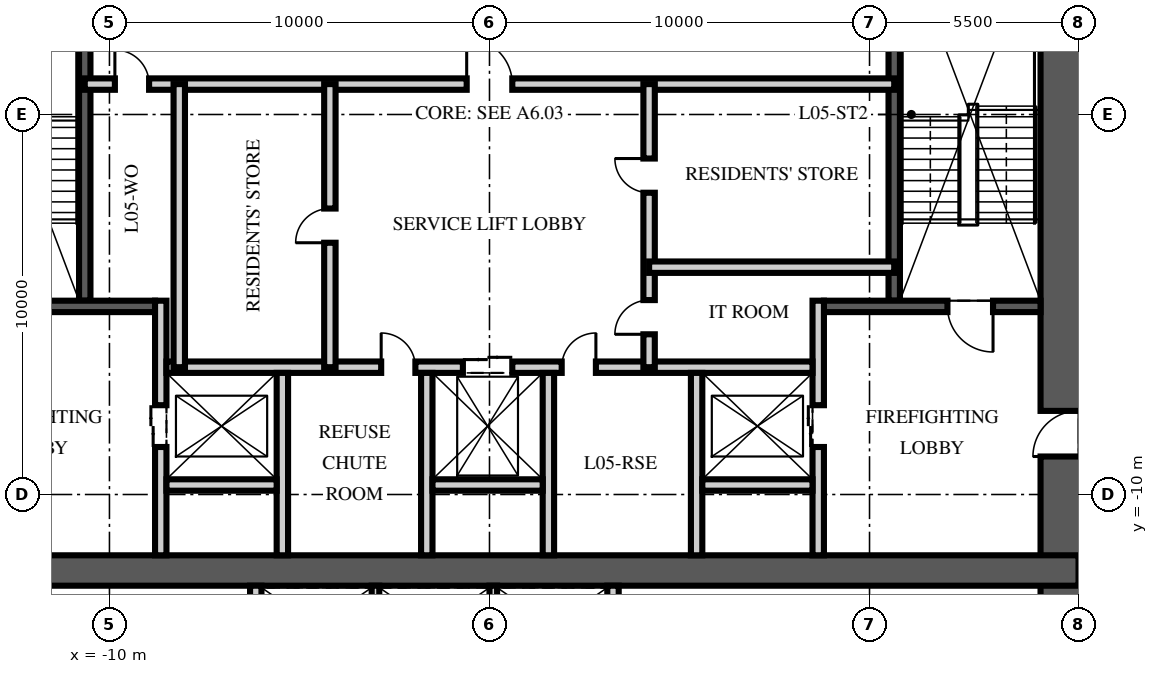
"""IFC4 building model, lengths in metres.
Left out: names, types, materials, properties, quantities, classifications, styles, units other than length and angle.
Written with IfcOpenShell. Run it as: python <this file> out.ifc"""

import sys

from ifc_helpers import new_model, si_unit, direction, frame, frame_2d, origin, place, context, subcontext, project, spatial, rectangle, extrude, element, fill, save


model = new_model("IFC4")
c1 = context("Model", 3, precision=1e-05, world=origin(), true_north=direction((0.0, 1.0)))
c2 = subcontext(c1, "Body", "Model", "MODEL_VIEW")
j1 = project(units=[si_unit("LENGTHUNIT", "METRE"), si_unit("PLANEANGLEUNIT", "RADIAN")], contexts=[c1])
p1 = place(None, origin())
s1 = spatial("IfcSite", under=j1, at=p1, CompositionType="ELEMENT")
p2 = place(p1, origin())
s2 = spatial("IfcBuilding", under=s1, at=p2, CompositionType="ELEMENT")
p3 = place(p2, frame((0.0, 0.0, 24.75)))
s3 = spatial("IfcBuildingStorey", under=s2, at=p3, CompositionType="ELEMENT", Elevation=24.75)
p4 = place(p3, frame((15.5, -15.5, -0.25), z_axis=(0.0, 0.0, 1.0), x_axis=(0.0, 1.0, 0.0)))
e1 = element("IfcWall", 1, at=p4, inside=s3, PredefinedType="SHEAR", context=c2, shape_type="SweptSolid", body=[
    extrude(rectangle(XDim=31.0, YDim=2.0, at=frame_2d((15.5, 0.0))), origin(), (0.0, 0.0, 1.0), 3.75),
])
p5 = place(p4, frame((6.5, 0.0, 0.25)))
e2 = element("IfcOpeningElement", 2, at=p5, cuts=e1, PredefinedType="OPENING", context=c2, shape_type="SweptSolid", body=[
    extrude(rectangle(XDim=1.2, YDim=2.1, at=frame_2d((0.6, 1.05))), frame((0.0, 1.01, 0.0), z_axis=(0.0, -1.0, 0.0), x_axis=(1.0, 0.0, 0.0)), (0.0, 0.0, 1.0), 2.02),
])
p6 = place(p4, frame((23.0, 0.0, 0.25)))
e3 = element("IfcOpeningElement", 3, at=p6, cuts=e1, PredefinedType="OPENING", context=c2, shape_type="SweptSolid", body=[
    extrude(rectangle(XDim=1.8, YDim=2.1, at=frame_2d((0.9, 1.05))), frame((0.0, 1.01, 0.0), z_axis=(0.0, -1.0, 0.0), x_axis=(1.0, 0.0, 0.0)), (0.0, 0.0, 1.0), 2.02),
])
p7 = place(p3, frame((-15.5, -12.0, -0.25), z_axis=(0.0, 0.0, 1.0), x_axis=(1.0, 0.0, 0.0)))
e4 = element("IfcWall", 4, at=p7, inside=s3, PredefinedType="SHEAR", context=c2, shape_type="SweptSolid", body=[
    extrude(rectangle(XDim=31.0, YDim=0.8, at=frame_2d((15.5, 0.0))), origin(), (0.0, 0.0, 1.0), 3.75),
])
p8 = place(p3, frame((-10.65, -4.9, 0.0), z_axis=(0.0, 0.0, 1.0), x_axis=(0.0, 1.0, 0.0)))
e5 = element("IfcWall", 5, at=p8, inside=s3, PredefinedType="SOLIDWALL", context=c2, shape_type="SweptSolid", body=[
    extrude(rectangle(XDim=10.1, YDim=0.3, at=frame_2d((5.05, 0.0))), origin(), (0.0, 0.0, 1.0), 3.5),
])
p9 = place(p3, frame((-14.5, -5.05, 0.0), z_axis=(0.0, 0.0, 1.0), x_axis=(1.0, 0.0, 0.0)))
e6 = element("IfcWall", 6, at=p9, inside=s3, PredefinedType="SOLIDWALL", context=c2, shape_type="SweptSolid", body=[
    extrude(rectangle(XDim=5.7, YDim=0.3, at=frame_2d((2.85, 0.0))), origin(), (0.0, 0.0, 1.0), 3.5),
])
p10 = place(p9, frame((1.25, 0.0, 0.0)))
e7 = element("IfcOpeningElement", 7, at=p10, cuts=e6, PredefinedType="OPENING", context=c2, shape_type="SweptSolid", body=[
    extrude(rectangle(XDim=1.2, YDim=2.1, at=frame_2d((0.6, 1.05))), frame((0.0, 0.16, 0.0), z_axis=(0.0, -1.0, 0.0), x_axis=(1.0, 0.0, 0.0)), (0.0, 0.0, 1.0), 0.32),
])
p11 = place(p3, frame((-8.65, -11.6, 0.0), z_axis=(0.0, 0.0, 1.0), x_axis=(0.0, 1.0, 0.0)))
e8 = element("IfcWall", 8, at=p11, inside=s3, PredefinedType="PARTITIONING", context=c2, shape_type="SweptSolid", body=[
    extrude(rectangle(XDim=6.7, YDim=0.3, at=frame_2d((3.35, 0.0))), origin(), (0.0, 0.0, 1.0), 3.5),
])
p12 = place(p11, frame((2.85, 0.0, 0.0)))
e9 = element("IfcOpeningElement", 9, at=p12, cuts=e8, PredefinedType="OPENING", context=c2, shape_type="SweptSolid", body=[
    extrude(rectangle(XDim=1.1, YDim=2.1, at=frame_2d((0.55, 1.05))), frame((0.0, 0.16, 0.0), z_axis=(0.0, -1.0, 0.0), x_axis=(1.0, 0.0, 0.0)), (0.0, 0.0, 1.0), 0.32),
])
p13 = place(p3, frame((10.65, -4.9, 0.0), z_axis=(0.0, 0.0, 1.0), x_axis=(0.0, 1.0, 0.0)))
e10 = element("IfcWall", 10, at=p13, inside=s3, PredefinedType="SOLIDWALL", context=c2, shape_type="SweptSolid", body=[
    extrude(rectangle(XDim=10.1, YDim=0.3, at=frame_2d((5.05, 0.0))), origin(), (0.0, 0.0, 1.0), 3.5),
])
p14 = place(p3, frame((14.5, -5.05, 0.0), z_axis=(0.0, 0.0, 1.0), x_axis=(-1.0, 0.0, 0.0)))
e11 = element("IfcWall", 11, at=p14, inside=s3, PredefinedType="SOLIDWALL", context=c2, shape_type="SweptSolid", body=[
    extrude(rectangle(XDim=5.7, YDim=0.3, at=frame_2d((2.85, 0.0))), origin(), (0.0, 0.0, 1.0), 3.5),
])
p15 = place(p14, frame((1.25, 0.0, 0.0)))
e12 = element("IfcOpeningElement", 12, at=p15, cuts=e11, PredefinedType="OPENING", context=c2, shape_type="SweptSolid", body=[
    extrude(rectangle(XDim=1.2, YDim=2.1, at=frame_2d((0.6, 1.05))), frame((0.0, 0.16, 0.0), z_axis=(0.0, -1.0, 0.0), x_axis=(1.0, 0.0, 0.0)), (0.0, 0.0, 1.0), 0.32),
])
p16 = place(p3, frame((8.65, -11.6, 0.0), z_axis=(0.0, 0.0, 1.0), x_axis=(0.0, 1.0, 0.0)))
e13 = element("IfcWall", 13, at=p16, inside=s3, PredefinedType="PARTITIONING", context=c2, shape_type="SweptSolid", body=[
    extrude(rectangle(XDim=6.7, YDim=0.3, at=frame_2d((3.35, 0.0))), origin(), (0.0, 0.0, 1.0), 3.5),
])
p17 = place(p16, frame((2.85, 0.0, 0.0)))
e14 = element("IfcOpeningElement", 14, at=p17, cuts=e13, PredefinedType="OPENING", context=c2, shape_type="SweptSolid", body=[
    extrude(rectangle(XDim=1.1, YDim=2.1, at=frame_2d((0.55, 1.05))), frame((0.0, 0.16, 0.0), z_axis=(0.0, -1.0, 0.0), x_axis=(1.0, 0.0, 0.0)), (0.0, 0.0, 1.0), 0.32),
])
p18 = place(p3, frame((-8.5, -6.65, 0.0), z_axis=(0.0, 0.0, 1.0), x_axis=(1.0, 0.0, 0.0)))
e15 = element("IfcWall", 15, at=p18, inside=s3, PredefinedType="PARTITIONING", context=c2, shape_type="SweptSolid", body=[
    extrude(rectangle(XDim=17.0, YDim=0.3, at=frame_2d((8.5, 0.0))), origin(), (0.0, 0.0, 1.0), 3.5),
])
p19 = place(p18, frame((7.8, 0.0, 0.0)))
e16 = element("IfcOpeningElement", 16, at=p19, cuts=e15, PredefinedType="OPENING", context=c2, shape_type="SweptSolid", body=[
    extrude(rectangle(XDim=1.3, YDim=2.4, at=frame_2d((0.65, 1.2))), frame((0.0, 0.16, 0.0), z_axis=(0.0, -1.0, 0.0), x_axis=(1.0, 0.0, 0.0)), (0.0, 0.0, 1.0), 0.32),
])
p20 = place(p18, frame((5.65, 0.0, 0.0)))
e17 = element("IfcOpeningElement", 17, at=p20, cuts=e15, PredefinedType="OPENING", context=c2, shape_type="SweptSolid", body=[
    extrude(rectangle(XDim=0.9, YDim=2.1, at=frame_2d((0.45, 1.05))), frame((0.0, 0.16, 0.0), z_axis=(0.0, -1.0, 0.0), x_axis=(1.0, 0.0, 0.0)), (0.0, 0.0, 1.0), 0.32),
])
p21 = place(p18, frame((10.4, 0.0, 0.0)))
e18 = element("IfcOpeningElement", 18, at=p21, cuts=e15, PredefinedType="OPENING", context=c2, shape_type="SweptSolid", body=[
    extrude(rectangle(XDim=0.9, YDim=2.1, at=frame_2d((0.45, 1.05))), frame((0.0, 0.16, 0.0), z_axis=(0.0, -1.0, 0.0), x_axis=(1.0, 0.0, 0.0)), (0.0, 0.0, 1.0), 0.32),
])
for number, where, z_axis, x_axis in (
    (19, (-5.45, -11.6, 0.0), (0.0, 0.0, 1.0), (0.0, 1.0, 0.0)),
    (20, (-1.65, -11.6, 0.0), (0.0, 0.0, 1.0), (0.0, 1.0, 0.0)),
    (21, (1.55, -11.6, 0.0), (0.0, 0.0, 1.0), (0.0, 1.0, 0.0)),
    (22, (5.45, -11.6, 0.0), (0.0, 0.0, 1.0), (0.0, 1.0, 0.0)),
):
    element("IfcWall", number, at=place(p3, frame(where, z_axis=z_axis, x_axis=x_axis)), inside=s3, PredefinedType="PARTITIONING", context=c2, shape_type="SweptSolid", body=[
        extrude(rectangle(XDim=4.8, YDim=0.3, at=frame_2d((2.4, 0.0))), origin(), (0.0, 0.0, 1.0), 3.5),
    ])
for number, where, z_axis, x_axis in (
    (23, (-8.5, -9.75, 0.0), (0.0, 0.0, 1.0), (1.0, 0.0, 0.0)),
    (24, (-1.5, -9.75, 0.0), (0.0, 0.0, 1.0), (1.0, 0.0, 0.0)),
    (25, (5.6, -9.75, 0.0), (0.0, 0.0, 1.0), (1.0, 0.0, 0.0)),
):
    element("IfcWall", number, at=place(p3, frame(where, z_axis=z_axis, x_axis=x_axis)), inside=s3, PredefinedType="PARTITIONING", context=c2, shape_type="SweptSolid", body=[
        extrude(rectangle(XDim=2.9, YDim=0.3, at=frame_2d((1.45, 0.0))), origin(), (0.0, 0.0, 1.0), 3.5),
    ])
for number, where, z_axis, x_axis in (
    (26, (-6.15, -14.5, 0.0), (0.0, 0.0, 1.0), (0.0, 1.0, 0.0)),
    (27, (3.25, -14.5, 0.0), (0.0, 0.0, 1.0), (0.0, 1.0, 0.0)),
):
    element("IfcWall", number, at=place(p3, frame(where, z_axis=z_axis, x_axis=x_axis)), inside=s3, PredefinedType="PARTITIONING", context=c2, shape_type="SweptSolid", body=[
        extrude(rectangle(XDim=2.1, YDim=0.3, at=frame_2d((1.05, 0.0))), origin(), (0.0, 0.0, 1.0), 3.5),
    ])
for number, where, z_axis, x_axis in (
    (28, (-3.0, -14.5, 0.0), (0.0, 0.0, 1.0), (0.0, 1.0, 0.0)),
    (29, (0.1, -14.5, 0.0), (0.0, 0.0, 1.0), (0.0, 1.0, 0.0)),
):
    element("IfcWall", number, at=place(p3, frame(where, z_axis=z_axis, x_axis=x_axis)), inside=s3, PredefinedType="PARTITIONING", context=c2, shape_type="SweptSolid", body=[
        extrude(rectangle(XDim=2.1, YDim=0.2, at=frame_2d((1.05, 0.0))), origin(), (0.0, 0.0, 1.0), 3.5),
    ])
p22 = place(p3, frame((-10.65, 0.8, 0.0), z_axis=(0.0, 0.0, 1.0), x_axis=(1.0, 0.0, 0.0)))
e30 = element("IfcWall", 30, at=p22, inside=s3, PredefinedType="PARTITIONING", context=c2, shape_type="SweptSolid", body=[
    extrude(rectangle(XDim=21.3, YDim=0.3, at=frame_2d((10.65, 0.0))), origin(), (0.0, 0.0, 1.0), 3.5),
])
p23 = place(p22, frame((10.05, 0.0, 0.0)))
e31 = element("IfcOpeningElement", 31, at=p23, cuts=e30, PredefinedType="OPENING", context=c2, shape_type="SweptSolid", body=[
    extrude(rectangle(XDim=1.2, YDim=2.1, at=frame_2d((0.6, 1.05))), frame((0.0, 0.16, 0.0), z_axis=(0.0, -1.0, 0.0), x_axis=(1.0, 0.0, 0.0)), (0.0, 0.0, 1.0), 0.32),
])
p24 = place(p22, frame((0.793, 0.0, 0.0)))
e32 = element("IfcOpeningElement", 32, at=p24, cuts=e30, PredefinedType="OPENING", context=c2, shape_type="SweptSolid", body=[
    extrude(rectangle(XDim=0.9, YDim=2.1, at=frame_2d((0.45, 1.05))), frame((0.0, 0.16, 0.0), z_axis=(0.0, -1.0, 0.0), x_axis=(1.0, 0.0, 0.0)), (0.0, 0.0, 1.0), 0.32),
])
p25 = place(p3, frame((-4.2, -6.65, 0.0), z_axis=(0.0, 0.0, 1.0), x_axis=(0.0, 1.0, 0.0)))
e33 = element("IfcWall", 33, at=p25, inside=s3, PredefinedType="PARTITIONING", context=c2, shape_type="SweptSolid", body=[
    extrude(rectangle(XDim=7.45, YDim=0.3, at=frame_2d((3.725, 0.0))), origin(), (0.0, 0.0, 1.0), 3.5),
])
p26 = place(p25, frame((3.275, 0.0, 0.0)))
e34 = element("IfcOpeningElement", 34, at=p26, cuts=e33, PredefinedType="OPENING", context=c2, shape_type="SweptSolid", body=[
    extrude(rectangle(XDim=0.9, YDim=2.1, at=frame_2d((0.45, 1.05))), frame((0.0, 0.16, 0.0), z_axis=(0.0, -1.0, 0.0), x_axis=(1.0, 0.0, 0.0)), (0.0, 0.0, 1.0), 0.32),
])
p27 = place(p3, frame((4.2, -6.65, 0.0), z_axis=(0.0, 0.0, 1.0), x_axis=(0.0, 1.0, 0.0)))
e35 = element("IfcWall", 35, at=p27, inside=s3, PredefinedType="PARTITIONING", context=c2, shape_type="SweptSolid", body=[
    extrude(rectangle(XDim=7.45, YDim=0.3, at=frame_2d((3.725, 0.0))), origin(), (0.0, 0.0, 1.0), 3.5),
])
p28 = place(p27, frame((0.866, 0.0, 0.0)))
e36 = element("IfcOpeningElement", 36, at=p28, cuts=e35, PredefinedType="OPENING", context=c2, shape_type="SweptSolid", body=[
    extrude(rectangle(XDim=0.9, YDim=2.1, at=frame_2d((0.45, 1.05))), frame((0.0, 0.16, 0.0), z_axis=(0.0, -1.0, 0.0), x_axis=(1.0, 0.0, 0.0)), (0.0, 0.0, 1.0), 0.32),
])
p29 = place(p27, frame((4.591, 0.0, 0.0)))
e37 = element("IfcOpeningElement", 37, at=p29, cuts=e35, PredefinedType="OPENING", context=c2, shape_type="SweptSolid", body=[
    extrude(rectangle(XDim=0.9, YDim=2.1, at=frame_2d((0.45, 1.05))), frame((0.0, 0.16, 0.0), z_axis=(0.0, -1.0, 0.0), x_axis=(1.0, 0.0, 0.0)), (0.0, 0.0, 1.0), 0.32),
])
p30 = place(p3, frame((-8.163, -6.65, 0.0), z_axis=(0.0, 0.0, 1.0), x_axis=(0.0, 1.0, 0.0)))
e38 = element("IfcWall", 38, at=p30, inside=s3, PredefinedType="PARTITIONING", context=c2, shape_type="SweptSolid", body=[
    extrude(rectangle(XDim=7.45, YDim=0.3, at=frame_2d((3.725, 0.0))), origin(), (0.0, 0.0, 1.0), 3.5),
])
p31 = place(p3, frame((10.65, -4.018, 0.0), z_axis=(0.0, 0.0, 1.0), x_axis=(-1.0, 0.0, 0.0)))
e39 = element("IfcWall", 39, at=p31, inside=s3, PredefinedType="PARTITIONING", context=c2, shape_type="SweptSolid", body=[
    extrude(rectangle(XDim=6.45, YDim=0.3, at=frame_2d((3.225, 0.0))), origin(), (0.0, 0.0, 1.0), 3.5),
])
p32 = place(p15, origin())
e40 = element("IfcDoor", 40, at=p32, inside=s3, OperationType="SINGLE_SWING_LEFT", PredefinedType="DOOR", context=c2, shape_type="SweptSolid", body=[
    extrude(rectangle(XDim=1.2, YDim=2.1, at=frame_2d((0.6, 1.05))), frame((0.0, 0.025, 0.0), z_axis=(0.0, -1.0, 0.0), x_axis=(1.0, 0.0, 0.0)), (0.0, 0.0, 1.0), 0.05),
])
fill(e12, e40)
p33 = place(p5, origin())
e41 = element("IfcDoor", 41, at=p33, inside=s3, OperationType="SINGLE_SWING_LEFT", PredefinedType="DOOR", context=c2, shape_type="SweptSolid", body=[
    extrude(rectangle(XDim=1.2, YDim=2.1, at=frame_2d((0.6, 1.05))), frame((0.0, 0.025, 0.0), z_axis=(0.0, -1.0, 0.0), x_axis=(1.0, 0.0, 0.0)), (0.0, 0.0, 1.0), 0.05),
])
fill(e2, e41)
p34 = place(p12, origin())
e42 = element("IfcDoor", 42, at=p34, inside=s3, OperationType="DOUBLE_DOOR_SLIDING", PredefinedType="DOOR", context=c2, shape_type="SweptSolid", body=[
    extrude(rectangle(XDim=1.1, YDim=2.1, at=frame_2d((0.55, 1.05))), frame((0.0, 0.025, 0.0), z_axis=(0.0, -1.0, 0.0), x_axis=(1.0, 0.0, 0.0)), (0.0, 0.0, 1.0), 0.05),
])
fill(e9, e42)
p35 = place(p17, origin())
e43 = element("IfcDoor", 43, at=p35, inside=s3, OperationType="DOUBLE_DOOR_SLIDING", PredefinedType="DOOR", context=c2, shape_type="SweptSolid", body=[
    extrude(rectangle(XDim=1.1, YDim=2.1, at=frame_2d((0.55, 1.05))), frame((0.0, 0.025, 0.0), z_axis=(0.0, -1.0, 0.0), x_axis=(1.0, 0.0, 0.0)), (0.0, 0.0, 1.0), 0.05),
])
fill(e14, e43)
p36 = place(p19, origin())
e44 = element("IfcDoor", 44, at=p36, inside=s3, OperationType="DOUBLE_DOOR_SLIDING", PredefinedType="DOOR", context=c2, shape_type="SweptSolid", body=[
    extrude(rectangle(XDim=1.3, YDim=2.4, at=frame_2d((0.65, 1.2))), frame((0.0, 0.025, 0.0), z_axis=(0.0, -1.0, 0.0), x_axis=(1.0, 0.0, 0.0)), (0.0, 0.0, 1.0), 0.05),
])
fill(e16, e44)
p37 = place(p23, origin())
e45 = element("IfcDoor", 45, at=p37, inside=s3, OperationType="SINGLE_SWING_LEFT", PredefinedType="DOOR", context=c2, shape_type="SweptSolid", body=[
    extrude(rectangle(XDim=1.2, YDim=2.1, at=frame_2d((0.6, 1.05))), frame((0.0, 0.025, 0.0), z_axis=(0.0, -1.0, 0.0), x_axis=(1.0, 0.0, 0.0)), (0.0, 0.0, 1.0), 0.05),
])
fill(e31, e45)
p38 = place(p20, origin())
e46 = element("IfcDoor", 46, at=p38, inside=s3, OperationType="SINGLE_SWING_LEFT", PredefinedType="DOOR", context=c2, shape_type="SweptSolid", body=[
    extrude(rectangle(XDim=0.9, YDim=2.1, at=frame_2d((0.45, 1.05))), frame((0.0, 0.025, 0.0), z_axis=(0.0, -1.0, 0.0), x_axis=(1.0, 0.0, 0.0)), (0.0, 0.0, 1.0), 0.05),
])
fill(e17, e46)
p39 = place(p21, origin())
e47 = element("IfcDoor", 47, at=p39, inside=s3, OperationType="SINGLE_SWING_RIGHT", PredefinedType="DOOR", context=c2, shape_type="SweptSolid", body=[
    extrude(rectangle(XDim=0.9, YDim=2.1, at=frame_2d((0.45, 1.05))), frame((0.0, 0.025, 0.0), z_axis=(0.0, -1.0, 0.0), x_axis=(1.0, 0.0, 0.0)), (0.0, 0.0, 1.0), 0.05),
])
fill(e18, e47)
p40 = place(p26, origin())
e48 = element("IfcDoor", 48, at=p40, inside=s3, OperationType="SINGLE_SWING_LEFT", PredefinedType="DOOR", context=c2, shape_type="SweptSolid", body=[
    extrude(rectangle(XDim=0.9, YDim=2.1, at=frame_2d((0.45, 1.05))), frame((0.0, 0.025, 0.0), z_axis=(0.0, -1.0, 0.0), x_axis=(1.0, 0.0, 0.0)), (0.0, 0.0, 1.0), 0.05),
])
fill(e34, e48)
p41 = place(p24, origin())
e49 = element("IfcDoor", 49, at=p41, inside=s3, OperationType="SINGLE_SWING_LEFT", PredefinedType="DOOR", context=c2, shape_type="SweptSolid", body=[
    extrude(rectangle(XDim=0.9, YDim=2.1, at=frame_2d((0.45, 1.05))), frame((0.0, 0.025, 0.0), z_axis=(0.0, -1.0, 0.0), x_axis=(1.0, 0.0, 0.0)), (0.0, 0.0, 1.0), 0.05),
])
fill(e32, e49)
p42 = place(p28, origin())
e50 = element("IfcDoor", 50, at=p42, inside=s3, OperationType="SINGLE_SWING_LEFT", PredefinedType="DOOR", context=c2, shape_type="SweptSolid", body=[
    extrude(rectangle(XDim=0.9, YDim=2.1, at=frame_2d((0.45, 1.05))), frame((0.0, 0.025, 0.0), z_axis=(0.0, -1.0, 0.0), x_axis=(1.0, 0.0, 0.0)), (0.0, 0.0, 1.0), 0.05),
])
fill(e36, e50)
p43 = place(p29, origin())
e51 = element("IfcDoor", 51, at=p43, inside=s3, OperationType="SINGLE_SWING_RIGHT", PredefinedType="DOOR", context=c2, shape_type="SweptSolid", body=[
    extrude(rectangle(XDim=0.9, YDim=2.1, at=frame_2d((0.45, 1.05))), frame((0.0, 0.025, 0.0), z_axis=(0.0, -1.0, 0.0), x_axis=(1.0, 0.0, 0.0)), (0.0, 0.0, 1.0), 0.05),
])
fill(e37, e51)
save(model, sys.argv[1])
